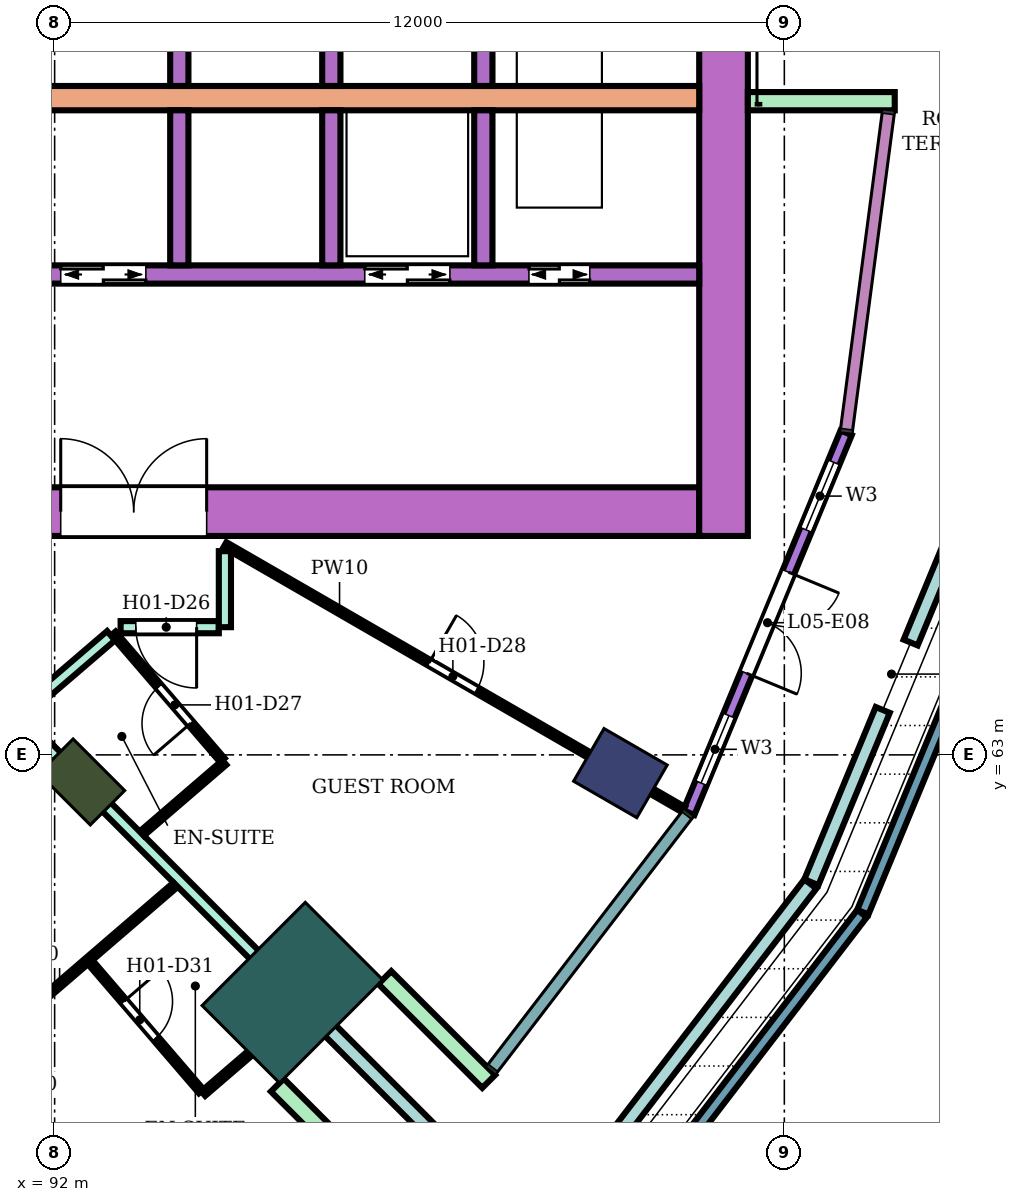
"""IFC4 building model, lengths in metres.
Left out: names, types, materials, properties, quantities, classifications, styles, units other than length and angle.
Written with IfcOpenShell. Run it as: python <this file> out.ifc"""

import sys

from ifc_helpers import new_model, si_unit, direction, frame, frame_2d, origin, origin_2d, place, context, subcontext, project, spatial, rectangle, extrude, element, fill, save


model = new_model("IFC4")
c1 = context("Model", 3, precision=1e-05, world=origin(), true_north=direction((0.0, 1.0)))
c2 = subcontext(c1, "Body", "Model", "MODEL_VIEW")
j1 = project(units=[si_unit("LENGTHUNIT", "METRE"), si_unit("PLANEANGLEUNIT", "RADIAN")], contexts=[c1])
p1 = place(None, origin())
s1 = spatial("IfcSite", under=j1, at=p1, CompositionType="ELEMENT")
p2 = place(p1, origin())
s2 = spatial("IfcBuilding", under=s1, at=p2, CompositionType="ELEMENT")
p3 = place(p2, frame((0.0, 0.0, 28.8)))
s3 = spatial("IfcBuildingStorey", under=s2, at=p3, CompositionType="ELEMENT", Elevation=28.8)
p4 = place(p3, frame((101.304, 62.7, 0.0), z_axis=(0.0, 0.0, 1.0), x_axis=(0.866025403784, -0.5, 0.0)))
e1 = element("IfcColumn", 1, at=p4, inside=s3, PredefinedType="COLUMN", context=c2, shape_type="SweptSolid", body=[
    extrude(rectangle(XDim=1.2, YDim=1.0, at=origin_2d()), origin(), (0.0, 0.0, 1.0), 3.8),
])
p5 = place(p3, frame((92.445, 62.555, 0.0), z_axis=(0.0, 0.0, 1.0), x_axis=(0.707106781187, -0.707106781187, 0.0)))
e2 = element("IfcColumn", 2, at=p5, inside=s3, PredefinedType="COLUMN", context=c2, shape_type="SweptSolid", body=[
    extrude(rectangle(XDim=1.2, YDim=0.8, at=origin_2d()), origin(), (0.0, 0.0, 1.0), 3.8),
])
p6 = place(p3, frame((95.91, 59.09, 0.0), z_axis=(0.0, 0.0, 1.0), x_axis=(0.707106781187, -0.707106781187, 0.0)))
e3 = element("IfcColumn", 3, at=p6, inside=s3, PredefinedType="COLUMN", context=c2, shape_type="SweptSolid", body=[
    extrude(rectangle(XDim=1.8, YDim=2.4, at=origin_2d()), origin(), (0.0, 0.0, 1.0), 3.8),
])
p7 = place(p3, frame((87.9, 67.0, 0.0), z_axis=(0.0, 0.0, 1.0), x_axis=(1.0, 0.0, 0.0)))
e4 = element("IfcWall", 4, at=p7, inside=s3, PredefinedType="SHEAR", context=c2, shape_type="SweptSolid", body=[
    extrude(rectangle(XDim=14.7, YDim=0.8, at=frame_2d((7.35, 0.0))), origin(), (0.0, 0.0, 1.0), 3.48),
])
p8 = place(p7, frame((4.2, 0.0, 0.0)))
e5 = element("IfcOpeningElement", 5, at=p8, cuts=e4, PredefinedType="OPENING", context=c2, shape_type="SweptSolid", body=[
    extrude(rectangle(XDim=2.4, YDim=2.4, at=frame_2d((1.2, 1.2))), frame((0.0, 0.41, 0.0), z_axis=(0.0, -1.0, 0.0), x_axis=(1.0, 0.0, 0.0)), (0.0, 0.0, 1.0), 0.82),
])
p9 = place(p3, frame((103.0, 66.6, 0.0), z_axis=(0.0, 0.0, 1.0), x_axis=(0.0, 1.0, 0.0)))
e6 = element("IfcWall", 6, at=p9, inside=s3, PredefinedType="SHEAR", context=c2, shape_type="SweptSolid", body=[
    extrude(rectangle(XDim=16.8, YDim=0.8, at=frame_2d((8.4, 0.0))), origin(), (0.0, 0.0, 1.0), 3.48),
])
p10 = place(p3, frame((91.7, 73.8, 0.0), z_axis=(0.0, 0.0, 1.0), x_axis=(1.0, 0.0, 0.0)))
e7 = element("IfcWall", 7, at=p10, inside=s3, PredefinedType="SHEAR", context=c2, shape_type="SweptSolid", body=[
    extrude(rectangle(XDim=10.9, YDim=0.4, at=frame_2d((5.45, 0.0))), origin(), (0.0, 0.0, 1.0), 3.48),
])
p11 = place(p3, frame((91.7, 70.9, 0.0), z_axis=(0.0, 0.0, 1.0), x_axis=(1.0, 0.0, 0.0)))
e8 = element("IfcWall", 8, at=p11, inside=s3, PredefinedType="SHEAR", context=c2, shape_type="SweptSolid", body=[
    extrude(rectangle(XDim=10.9, YDim=0.3, at=frame_2d((5.45, 0.0))), origin(), (0.0, 0.0, 1.0), 3.48),
])
p12 = place(p11, frame((0.4, 0.0, 0.0)))
e9 = element("IfcOpeningElement", 9, at=p12, cuts=e8, PredefinedType="OPENING", context=c2, shape_type="SweptSolid", body=[
    extrude(rectangle(XDim=1.4, YDim=2.1, at=frame_2d((0.7, 1.05))), frame((0.0, 0.16, 0.0), z_axis=(0.0, -1.0, 0.0), x_axis=(1.0, 0.0, 0.0)), (0.0, 0.0, 1.0), 0.32),
])
p13 = place(p11, frame((5.4, 0.0, 0.0)))
e10 = element("IfcOpeningElement", 10, at=p13, cuts=e8, PredefinedType="OPENING", context=c2, shape_type="SweptSolid", body=[
    extrude(rectangle(XDim=1.4, YDim=2.1, at=frame_2d((0.7, 1.05))), frame((0.0, 0.16, 0.0), z_axis=(0.0, -1.0, 0.0), x_axis=(1.0, 0.0, 0.0)), (0.0, 0.0, 1.0), 0.32),
])
p14 = place(p11, frame((8.1, 0.0, 0.0)))
e11 = element("IfcOpeningElement", 11, at=p14, cuts=e8, PredefinedType="OPENING", context=c2, shape_type="SweptSolid", body=[
    extrude(rectangle(XDim=1.0, YDim=2.1, at=frame_2d((0.5, 1.05))), frame((0.0, 0.16, 0.0), z_axis=(0.0, -1.0, 0.0), x_axis=(1.0, 0.0, 0.0)), (0.0, 0.0, 1.0), 0.32),
])
for number, where, z_axis, x_axis in (
    (12, (94.05, 74.0, 0.0), (0.0, 0.0, 1.0), (0.0, 1.0, 0.0)),
    (13, (96.55, 74.0, 0.0), (0.0, 0.0, 1.0), (0.0, 1.0, 0.0)),
    (14, (99.05, 74.0, 0.0), (0.0, 0.0, 1.0), (0.0, 1.0, 0.0)),
    (15, (94.05, 71.05, 0.0), (0.0, 0.0, 1.0), (0.0, 1.0, 0.0)),
    (16, (96.55, 71.05, 0.0), (0.0, 0.0, 1.0), (0.0, 1.0, 0.0)),
    (17, (99.05, 71.05, 0.0), (0.0, 0.0, 1.0), (0.0, 1.0, 0.0)),
):
    element("IfcWall", number, at=place(p3, frame(where, z_axis=z_axis, x_axis=x_axis)), inside=s3, PredefinedType="SHEAR", context=c2, shape_type="SweptSolid", body=[
        extrude(rectangle(XDim=2.55, YDim=0.3, at=frame_2d((1.275, 0.0))), origin(), (0.0, 0.0, 1.0), 3.48),
    ])
p15 = place(p3, frame((102.429, 62.051, 0.0), z_axis=(0.0, 0.0, 1.0), x_axis=(0.382694096902, 0.923875115043, 0.0)))
e18 = element("IfcWall", 18, at=p15, inside=s3, PredefinedType="NOTDEFINED", context=c2, shape_type="SweptSolid", body=[
    extrude(rectangle(XDim=6.761, YDim=0.2, at=frame_2d((3.38, 0.0))), origin(), (0.0, 0.0, 1.0), 3.8),
])
p16 = place(p15, frame((0.527, 0.0, 0.9)))
e19 = element("IfcOpeningElement", 19, at=p16, cuts=e18, PredefinedType="OPENING", context=c2, shape_type="SweptSolid", body=[
    extrude(rectangle(XDim=1.2, YDim=2.4, at=frame_2d((0.6, 1.2))), frame((0.0, 0.11, 0.0), z_axis=(0.0, -1.0, 0.0), x_axis=(1.0, 0.0, 0.0)), (0.0, 0.0, 1.0), 0.22),
])
p17 = place(p15, frame((2.48, 0.0, 0.0)))
e20 = element("IfcOpeningElement", 20, at=p17, cuts=e18, PredefinedType="OPENING", context=c2, shape_type="SweptSolid", body=[
    extrude(rectangle(XDim=1.8, YDim=2.4, at=frame_2d((0.9, 1.2))), frame((0.0, 0.11, 0.0), z_axis=(0.0, -1.0, 0.0), x_axis=(1.0, 0.0, 0.0)), (0.0, 0.0, 1.0), 0.22),
])
p18 = place(p15, frame((5.034, 0.0, 0.9)))
e21 = element("IfcOpeningElement", 21, at=p18, cuts=e18, PredefinedType="OPENING", context=c2, shape_type="SweptSolid", body=[
    extrude(rectangle(XDim=1.2, YDim=2.4, at=frame_2d((0.6, 1.2))), frame((0.0, 0.11, 0.0), z_axis=(0.0, -1.0, 0.0), x_axis=(1.0, 0.0, 0.0)), (0.0, 0.0, 1.0), 0.22),
])
for number, where, z_axis, x_axis in (
    (22, (103.4, 73.75, 0.0), (0.0, 0.0, 1.0), (1.0, 0.0, 0.0)),
    (23, (95.662, 57.57, 0.0), (0.0, 0.0, 1.0), (0.707, -0.707, 0.0)),
    (24, (97.43, 59.338, 0.0), (0.0, 0.0, 1.0), (0.707, -0.707, 0.0)),
):
    element("IfcWall", number, at=place(p3, frame(where, z_axis=z_axis, x_axis=x_axis)), inside=s3, PredefinedType="NOTDEFINED", context=c2, shape_type="SweptSolid", body=[
        extrude(rectangle(XDim=2.416, YDim=0.3, at=frame_2d((1.208, 0.0))), origin(), (0.0, 0.0, 1.0), 3.8),
    ])
p19 = place(p3, frame((108.198, 67.431, 0.0), z_axis=(0.0, 0.0, 1.0), x_axis=(-0.382690553965, -0.923876582616, 0.0)))
e25 = element("IfcWall", 25, at=p19, inside=s3, PredefinedType="PARAPET", context=c2, shape_type="SweptSolid", body=[
    extrude(rectangle(XDim=7.595, YDim=0.2, at=frame_2d((3.798, 0.0))), origin(), (0.0, 0.0, 1.0), 1.1),
])
p20 = place(p3, frame((105.278, 60.391, 0.0), z_axis=(0.0, 0.0, 1.0), x_axis=(-0.608742572971, -0.793367808682, 0.0)))
e26 = element("IfcWall", 26, at=p20, inside=s3, PredefinedType="PARAPET", context=c2, shape_type="SweptSolid", body=[
    extrude(rectangle(XDim=7.596, YDim=0.2, at=frame_2d((3.798, 0.0))), origin(), (0.0, 0.0, 1.0), 1.1),
])
for number, where, z_axis, x_axis in (
    (27, (107.251, 67.681, 0.0), (0.0, 0.0, 1.0), (-0.383, -0.924, 0.0)),
    (28, (105.618, 63.739, 0.0), (0.0, 0.0, 1.0), (-0.383, -0.924, 0.0)),
):
    element("IfcWall", number, at=place(p3, frame(where, z_axis=z_axis, x_axis=x_axis)), inside=s3, PredefinedType="USERDEFINED", context=c2, shape_type="SweptSolid", body=[
        extrude(rectangle(XDim=3.067, YDim=0.25, at=frame_2d((1.533, 0.0))), origin(), (0.0, 0.0, 1.0), 0.6),
    ])
p21 = place(p3, frame((104.428, 60.877, 0.0), z_axis=(0.0, 0.0, 1.0), x_axis=(-0.608758005668, -0.793355967101, 0.0)))
e29 = element("IfcWall", 29, at=p21, inside=s3, PredefinedType="USERDEFINED", context=c2, shape_type="SweptSolid", body=[
    extrude(rectangle(XDim=6.232, YDim=0.25, at=frame_2d((3.116, 0.0))), origin(), (0.0, 0.0, 1.0), 0.6),
])
p22 = place(p3, frame((99.876, 55.124, 0.0), z_axis=(0.0, 0.0, 1.0), x_axis=(-0.707106781187, 0.707106781187, 0.0)))
e30 = element("IfcWall", 30, at=p22, inside=s3, PredefinedType="USERDEFINED", context=c2, shape_type="SweptSolid", body=[
    extrude(rectangle(XDim=4.909, YDim=0.25, at=frame_2d((2.455, 0.0))), origin(), (0.0, 0.0, 1.0), 0.6),
])
p23 = place(p3, frame((88.235, 60.931, 0.0), z_axis=(0.0, 0.0, 1.0), x_axis=(0.758799498714, 0.651324282329, 0.0)))
e31 = element("IfcWall", 31, at=p23, inside=s3, PredefinedType="PARTITIONING", context=c2, shape_type="SweptSolid", body=[
    extrude(rectangle(XDim=6.186, YDim=0.2, at=frame_2d((3.093, 0.0))), origin(), (0.0, 0.0, 1.0), 3.35),
])
p24 = place(p23, frame((1.519, 0.0, 0.0)))
e32 = element("IfcOpeningElement", 32, at=p24, cuts=e31, PredefinedType="OPENING", context=c2, shape_type="SweptSolid", body=[
    extrude(rectangle(XDim=1.0, YDim=2.1, at=frame_2d((0.5, 1.05))), frame((0.0, 0.11, 0.0), z_axis=(0.0, -1.0, 0.0), x_axis=(1.0, 0.0, 0.0)), (0.0, 0.0, 1.0), 0.22),
])
p25 = place(p3, frame((88.16, 60.863, 0.0), z_axis=(0.0, 0.0, 1.0), x_axis=(0.499946996988, -0.866056002925, 0.0)))
e33 = element("IfcWall", 33, at=p25, inside=s3, PredefinedType="PARTITIONING", context=c2, shape_type="SweptSolid", body=[
    extrude(rectangle(XDim=9.475, YDim=0.2, at=frame_2d((4.737, 0.0))), origin(), (0.0, 0.0, 1.0), 3.35),
])
p26 = place(p3, frame((91.449, 63.548, 0.0), z_axis=(0.0, 0.0, 1.0), x_axis=(0.706984804638, -0.707228736698, 0.0)))
e34 = element("IfcWall", 34, at=p26, inside=s3, PredefinedType="PARTITIONING", context=c2, shape_type="SweptSolid", body=[
    extrude(rectangle(XDim=7.006, YDim=0.2, at=frame_2d((3.503, 0.0))), origin(), (0.0, 0.0, 1.0), 3.35),
])
p27 = place(p3, frame((93.085, 65.1, 0.0), z_axis=(0.0, 0.0, 1.0), x_axis=(1.0, 0.0, 0.0)))
e35 = element("IfcWall", 35, at=p27, inside=s3, PredefinedType="PARTITIONING", context=c2, shape_type="SweptSolid", body=[
    extrude(rectangle(XDim=1.615, YDim=0.2, at=frame_2d((0.808, 0.0))), origin(), (0.0, 0.0, 1.0), 3.35),
])
p28 = place(p27, frame((0.25, 0.0, 0.0)))
e36 = element("IfcOpeningElement", 36, at=p28, cuts=e35, PredefinedType="OPENING", context=c2, shape_type="SweptSolid", body=[
    extrude(rectangle(XDim=1.0, YDim=2.1, at=frame_2d((0.5, 1.05))), frame((0.0, 0.11, 0.0), z_axis=(0.0, -1.0, 0.0), x_axis=(1.0, 0.0, 0.0)), (0.0, 0.0, 1.0), 0.22),
])
p29 = place(p3, frame((94.8, 65.1, 0.0), z_axis=(0.0, 0.0, 1.0), x_axis=(0.0, 1.0, 0.0)))
e37 = element("IfcWall", 37, at=p29, inside=s3, PredefinedType="PARTITIONING", context=c2, shape_type="SweptSolid", body=[
    extrude(rectangle(XDim=1.25, YDim=0.2, at=frame_2d((0.625, 0.0))), origin(), (0.0, 0.0, 1.0), 3.35),
])
p30 = place(p3, frame((90.178, 57.587, 0.0), z_axis=(0.0, 0.0, 1.0), x_axis=(0.758140003227, 0.652091815243, 0.0)))
e38 = element("IfcWall", 38, at=p30, inside=s3, PredefinedType="PARTITIONING", context=c2, shape_type="SweptSolid", body=[
    extrude(rectangle(XDim=5.021, YDim=0.1, at=frame_2d((2.51, 0.0))), origin(), (0.0, 0.0, 1.0), 3.35),
])
p31 = place(p30, frame((1.071, 0.0, 0.0)))
e39 = element("IfcOpeningElement", 39, at=p31, cuts=e38, PredefinedType="OPENING", context=c2, shape_type="SweptSolid", body=[
    extrude(rectangle(XDim=0.9, YDim=2.1, at=frame_2d((0.45, 1.05))), frame((0.0, 0.06, 0.0), z_axis=(0.0, -1.0, 0.0), x_axis=(1.0, 0.0, 0.0)), (0.0, 0.0, 1.0), 0.12),
])
p32 = place(p3, frame((92.585, 59.591, 0.0), z_axis=(0.0, 0.0, 1.0), x_axis=(0.652011200591, -0.758209334092, 0.0)))
e40 = element("IfcWall", 40, at=p32, inside=s3, PredefinedType="PARTITIONING", context=c2, shape_type="SweptSolid", body=[
    extrude(rectangle(XDim=2.8, YDim=0.1, at=frame_2d((1.4, 0.0))), origin(), (0.0, 0.0, 1.0), 3.35),
])
p33 = place(p32, frame((0.85, 0.0, 0.0)))
e41 = element("IfcOpeningElement", 41, at=p33, cuts=e40, PredefinedType="OPENING", context=c2, shape_type="SweptSolid", body=[
    extrude(rectangle(XDim=0.8, YDim=2.1, at=frame_2d((0.4, 1.05))), frame((0.0, 0.06, 0.0), z_axis=(0.0, -1.0, 0.0), x_axis=(1.0, 0.0, 0.0)), (0.0, 0.0, 1.0), 0.12),
])
p34 = place(p3, frame((92.965, 64.997, 0.0), z_axis=(0.0, 0.0, 1.0), x_axis=(0.652069888227, -0.758158862553, 0.0)))
e42 = element("IfcWall", 42, at=p34, inside=s3, PredefinedType="PARTITIONING", context=c2, shape_type="SweptSolid", body=[
    extrude(rectangle(XDim=2.75, YDim=0.1, at=frame_2d((1.375, 0.0))), origin(), (0.0, 0.0, 1.0), 3.35),
])
p35 = place(p34, frame((1.15, 0.0, 0.0)))
e43 = element("IfcOpeningElement", 43, at=p35, cuts=e42, PredefinedType="OPENING", context=c2, shape_type="SweptSolid", body=[
    extrude(rectangle(XDim=0.8, YDim=2.1, at=frame_2d((0.4, 1.05))), frame((0.0, 0.06, 0.0), z_axis=(0.0, -1.0, 0.0), x_axis=(1.0, 0.0, 0.0)), (0.0, 0.0, 1.0), 0.12),
])
p36 = place(p3, frame((93.435, 61.707, 0.0), z_axis=(0.0, 0.0, 1.0), x_axis=(0.758070495124, 0.652172618578, 0.0)))
e44 = element("IfcWall", 44, at=p36, inside=s3, PredefinedType="PARTITIONING", context=c2, shape_type="SweptSolid", body=[
    extrude(rectangle(XDim=1.789, YDim=0.1, at=frame_2d((0.895, 0.0))), origin(), (0.0, 0.0, 1.0), 3.35),
])
p37 = place(p3, frame((94.443, 57.43, 0.0), z_axis=(0.0, 0.0, 1.0), x_axis=(0.757840386328, 0.65243999636, 0.0)))
e45 = element("IfcWall", 45, at=p37, inside=s3, PredefinedType="PARTITIONING", context=c2, shape_type="SweptSolid", body=[
    extrude(rectangle(XDim=2.108, YDim=0.1, at=frame_2d((1.054, 0.0))), origin(), (0.0, 0.0, 1.0), 3.35),
])
p38 = place(p3, frame((94.8, 66.455, 0.0), z_axis=(0.0, 0.0, 1.0), x_axis=(0.86602264145, -0.500004784474, 0.0)))
e46 = element("IfcWall", 46, at=p38, inside=s3, PredefinedType="PARTITIONING", context=c2, shape_type="SweptSolid", body=[
    extrude(rectangle(XDim=8.708, YDim=0.1, at=frame_2d((4.354, 0.0))), origin(), (0.0, 0.0, 1.0), 3.35),
])
p39 = place(p38, frame((3.879, 0.0, 0.0)))
e47 = element("IfcOpeningElement", 47, at=p39, cuts=e46, PredefinedType="OPENING", context=c2, shape_type="SweptSolid", body=[
    extrude(rectangle(XDim=0.9, YDim=2.1, at=frame_2d((0.45, 1.05))), frame((0.0, 0.06, 0.0), z_axis=(0.0, -1.0, 0.0), x_axis=(1.0, 0.0, 0.0)), (0.0, 0.0, 1.0), 0.12),
])
p40 = place(p16, origin())
e48 = element("IfcWindow", 48, at=p40, inside=s3, PartitioningType="SINGLE_PANEL", PredefinedType="WINDOW", context=c2, shape_type="SweptSolid", body=[
    extrude(rectangle(XDim=1.2, YDim=2.4, at=frame_2d((0.6, 1.2))), frame((0.0, 0.03, 0.0), z_axis=(0.0, -1.0, 0.0), x_axis=(1.0, 0.0, 0.0)), (0.0, 0.0, 1.0), 0.06),
])
fill(e19, e48)
p41 = place(p17, frame((1.8, 0.0, 0.0), z_axis=(0.0, 0.0, 1.0), x_axis=(-1.0, 0.0, 0.0)))
e49 = element("IfcDoor", 49, at=p41, inside=s3, OperationType="DOUBLE_DOOR_SINGLE_SWING", PredefinedType="DOOR", context=c2, shape_type="SweptSolid", body=[
    extrude(rectangle(XDim=1.8, YDim=2.4, at=frame_2d((0.9, 1.2))), frame((0.0, 0.025, 0.0), z_axis=(0.0, -1.0, 0.0), x_axis=(1.0, 0.0, 0.0)), (0.0, 0.0, 1.0), 0.05),
])
fill(e20, e49)
p42 = place(p18, origin())
e50 = element("IfcWindow", 50, at=p42, inside=s3, PartitioningType="SINGLE_PANEL", PredefinedType="WINDOW", context=c2, shape_type="SweptSolid", body=[
    extrude(rectangle(XDim=1.2, YDim=2.4, at=frame_2d((0.6, 1.2))), frame((0.0, 0.03, 0.0), z_axis=(0.0, -1.0, 0.0), x_axis=(1.0, 0.0, 0.0)), (0.0, 0.0, 1.0), 0.06),
])
fill(e21, e50)
p43 = place(p28, frame((1.0, 0.0, 0.0), z_axis=(0.0, 0.0, 1.0), x_axis=(-1.0, 0.0, 0.0)))
e51 = element("IfcDoor", 51, at=p43, inside=s3, OperationType="SINGLE_SWING_LEFT", PredefinedType="DOOR", context=c2, shape_type="SweptSolid", body=[
    extrude(rectangle(XDim=1.0, YDim=2.1, at=frame_2d((0.5, 1.05))), frame((0.0, 0.025, 0.0), z_axis=(0.0, -1.0, 0.0), x_axis=(1.0, 0.0, 0.0)), (0.0, 0.0, 1.0), 0.05),
])
fill(e36, e51)
p44 = place(p35, frame((0.8, 0.0, 0.0), z_axis=(0.0, 0.0, 1.0), x_axis=(-1.0, 0.0, 0.0)))
e52 = element("IfcDoor", 52, at=p44, inside=s3, OperationType="SINGLE_SWING_LEFT", PredefinedType="DOOR", context=c2, shape_type="SweptSolid", body=[
    extrude(rectangle(XDim=0.8, YDim=2.1, at=frame_2d((0.4, 1.05))), frame((0.0, 0.025, 0.0), z_axis=(0.0, -1.0, 0.0), x_axis=(1.0, 0.0, 0.0)), (0.0, 0.0, 1.0), 0.05),
])
fill(e43, e52)
p45 = place(p39, origin())
e53 = element("IfcDoor", 53, at=p45, inside=s3, OperationType="SINGLE_SWING_LEFT", PredefinedType="DOOR", context=c2, shape_type="SweptSolid", body=[
    extrude(rectangle(XDim=0.9, YDim=2.1, at=frame_2d((0.45, 1.05))), frame((0.0, 0.025, 0.0), z_axis=(0.0, -1.0, 0.0), x_axis=(1.0, 0.0, 0.0)), (0.0, 0.0, 1.0), 0.05),
])
fill(e47, e53)
p46 = place(p33, origin())
e54 = element("IfcDoor", 54, at=p46, inside=s3, OperationType="SINGLE_SWING_LEFT", PredefinedType="DOOR", context=c2, shape_type="SweptSolid", body=[
    extrude(rectangle(XDim=0.8, YDim=2.1, at=frame_2d((0.4, 1.05))), frame((0.0, 0.025, 0.0), z_axis=(0.0, -1.0, 0.0), x_axis=(1.0, 0.0, 0.0)), (0.0, 0.0, 1.0), 0.05),
])
fill(e41, e54)
p47 = place(p12, origin())
e55 = element("IfcDoor", 55, at=p47, inside=s3, OperationType="DOUBLE_DOOR_SLIDING", PredefinedType="DOOR", context=c2, shape_type="SweptSolid", body=[
    extrude(rectangle(XDim=1.4, YDim=2.1, at=frame_2d((0.7, 1.05))), frame((0.0, 0.025, 0.0), z_axis=(0.0, -1.0, 0.0), x_axis=(1.0, 0.0, 0.0)), (0.0, 0.0, 1.0), 0.05),
])
fill(e9, e55)
p48 = place(p13, origin())
e56 = element("IfcDoor", 56, at=p48, inside=s3, OperationType="DOUBLE_DOOR_SLIDING", PredefinedType="DOOR", context=c2, shape_type="SweptSolid", body=[
    extrude(rectangle(XDim=1.4, YDim=2.1, at=frame_2d((0.7, 1.05))), frame((0.0, 0.025, 0.0), z_axis=(0.0, -1.0, 0.0), x_axis=(1.0, 0.0, 0.0)), (0.0, 0.0, 1.0), 0.05),
])
fill(e10, e56)
p49 = place(p14, origin())
e57 = element("IfcDoor", 57, at=p49, inside=s3, OperationType="DOUBLE_DOOR_SLIDING", PredefinedType="DOOR", context=c2, shape_type="SweptSolid", body=[
    extrude(rectangle(XDim=1.0, YDim=2.1, at=frame_2d((0.5, 1.05))), frame((0.0, 0.025, 0.0), z_axis=(0.0, -1.0, 0.0), x_axis=(1.0, 0.0, 0.0)), (0.0, 0.0, 1.0), 0.05),
])
fill(e11, e57)
p50 = place(p8, origin())
e58 = element("IfcDoor", 58, at=p50, inside=s3, OperationType="DOUBLE_DOOR_SINGLE_SWING", PredefinedType="DOOR", context=c2, shape_type="SweptSolid", body=[
    extrude(rectangle(XDim=2.4, YDim=2.4, at=frame_2d((1.2, 1.2))), frame((0.0, 0.025, 0.0), z_axis=(0.0, -1.0, 0.0), x_axis=(1.0, 0.0, 0.0)), (0.0, 0.0, 1.0), 0.05),
])
fill(e5, e58)
save(model, sys.argv[1])
